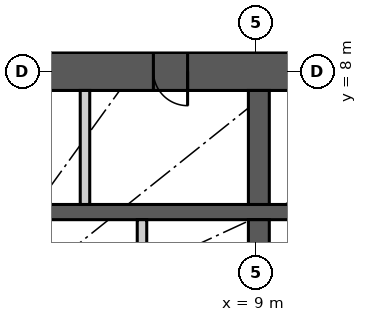
"""IFC4 building model, lengths in metres.
Left out: names, types, materials, properties, quantities, classifications, styles, units other than length and angle.
Written with IfcOpenShell. Run it as: python <this file> out.ifc"""

import sys

from ifc_helpers import new_model, si_unit, direction, frame, frame_2d, origin, place, context, subcontext, project, spatial, rectangle, extrude, element, fill, save


model = new_model("IFC4")
c1 = context("Model", 3, precision=1e-05, world=origin(), true_north=direction((0.0, 1.0)))
c2 = subcontext(c1, "Body", "Model", "MODEL_VIEW")
j1 = project(units=[si_unit("LENGTHUNIT", "METRE"), si_unit("PLANEANGLEUNIT", "RADIAN")], contexts=[c1])
p1 = place(None, origin())
s1 = spatial("IfcSite", under=j1, at=p1, CompositionType="ELEMENT")
p2 = place(p1, origin())
s2 = spatial("IfcBuilding", under=s1, at=p2, CompositionType="ELEMENT")
p3 = place(p2, frame((0.0, 0.0, -6.0)))
s3 = spatial("IfcBuildingStorey", under=s2, at=p3, CompositionType="ELEMENT", Elevation=-6.0)
p4 = place(p3, frame((-12.5, 8.0, 0.0), z_axis=(0.0, 0.0, 1.0), x_axis=(1.0, 0.0, 0.0)))
e1 = element("IfcWall", 1, at=p4, inside=s3, PredefinedType="SHEAR", context=c2, shape_type="SweptSolid", body=[
    extrude(rectangle(XDim=25.0, YDim=1.0, at=frame_2d((12.5, 0.0))), origin(), (0.0, 0.0, 1.0), 6.0),
])
p5 = place(p4, frame((11.2, 0.0, 0.0)))
e2 = element("IfcOpeningElement", 2, at=p5, cuts=e1, PredefinedType="OPENING", context=c2, shape_type="SweptSolid", body=[
    extrude(rectangle(XDim=1.2, YDim=2.2, at=frame_2d((0.6, 1.1))), frame((0.0, 0.51, 0.0), z_axis=(0.0, -1.0, 0.0), x_axis=(1.0, 0.0, 0.0)), (0.0, 0.0, 1.0), 1.02),
])
p6 = place(p4, frame((18.8, 0.0, 0.0)))
e3 = element("IfcOpeningElement", 3, at=p6, cuts=e1, PredefinedType="OPENING", context=c2, shape_type="SweptSolid", body=[
    extrude(rectangle(XDim=0.9, YDim=2.2, at=frame_2d((0.45, 1.1))), frame((0.0, 0.51, 0.0), z_axis=(0.0, -1.0, 0.0), x_axis=(1.0, 0.0, 0.0)), (0.0, 0.0, 1.0), 1.02),
])
p7 = place(p3, frame((-11.5, 4.3, 0.0), z_axis=(0.0, 0.0, 1.0), x_axis=(1.0, 0.0, 0.0)))
e4 = element("IfcWall", 4, at=p7, inside=s3, PredefinedType="SHEAR", context=c2, shape_type="SweptSolid", body=[
    extrude(rectangle(XDim=23.0, YDim=0.4, at=frame_2d((11.5, 0.0))), origin(), (0.0, 0.0, 1.0), 6.0),
])
p8 = place(p3, frame((9.075, 4.5, 0.0), z_axis=(0.0, 0.0, 1.0), x_axis=(0.0, 1.0, 0.0)))
e5 = element("IfcWall", 5, at=p8, inside=s3, PredefinedType="SHEAR", context=c2, shape_type="SweptSolid", body=[
    extrude(rectangle(XDim=3.0, YDim=0.55, at=frame_2d((1.5, 0.0))), origin(), (0.0, 0.0, 1.0), 6.0),
])
p9 = place(p3, frame((9.075, 1.75, 0.0), z_axis=(0.0, 0.0, 1.0), x_axis=(0.0, 1.0, 0.0)))
e6 = element("IfcWall", 6, at=p9, inside=s3, PredefinedType="SHEAR", context=c2, shape_type="SweptSolid", body=[
    extrude(rectangle(XDim=2.35, YDim=0.55, at=frame_2d((1.175, 0.0))), origin(), (0.0, 0.0, 1.0), 6.0),
])
p10 = place(p3, frame((4.5, 4.5, 0.0), z_axis=(0.0, 0.0, 1.0), x_axis=(0.0, 1.0, 0.0)))
e7 = element("IfcWall", 7, at=p10, inside=s3, PredefinedType="PARTITIONING", context=c2, shape_type="SweptSolid", body=[
    extrude(rectangle(XDim=3.0, YDim=0.25, at=frame_2d((1.5, 0.0))), origin(), (0.0, 0.0, 1.0), 6.0),
])
p11 = place(p3, frame((6.0, 1.75, 0.0), z_axis=(0.0, 0.0, 1.0), x_axis=(0.0, 1.0, 0.0)))
e8 = element("IfcWall", 8, at=p11, inside=s3, PredefinedType="PARTITIONING", context=c2, shape_type="SweptSolid", body=[
    extrude(rectangle(XDim=2.35, YDim=0.25, at=frame_2d((1.175, 0.0))), origin(), (0.0, 0.0, 1.0), 6.0),
])
p12 = place(p6, origin())
e9 = element("IfcDoor", 9, at=p12, inside=s3, OperationType="SINGLE_SWING_RIGHT", PredefinedType="DOOR", context=c2, shape_type="SweptSolid", body=[
    extrude(rectangle(XDim=0.9, YDim=2.2, at=frame_2d((0.45, 1.1))), frame((0.0, 0.025, 0.0), z_axis=(0.0, -1.0, 0.0), x_axis=(1.0, 0.0, 0.0)), (0.0, 0.0, 1.0), 0.05),
])
fill(e3, e9)
save(model, sys.argv[1])
